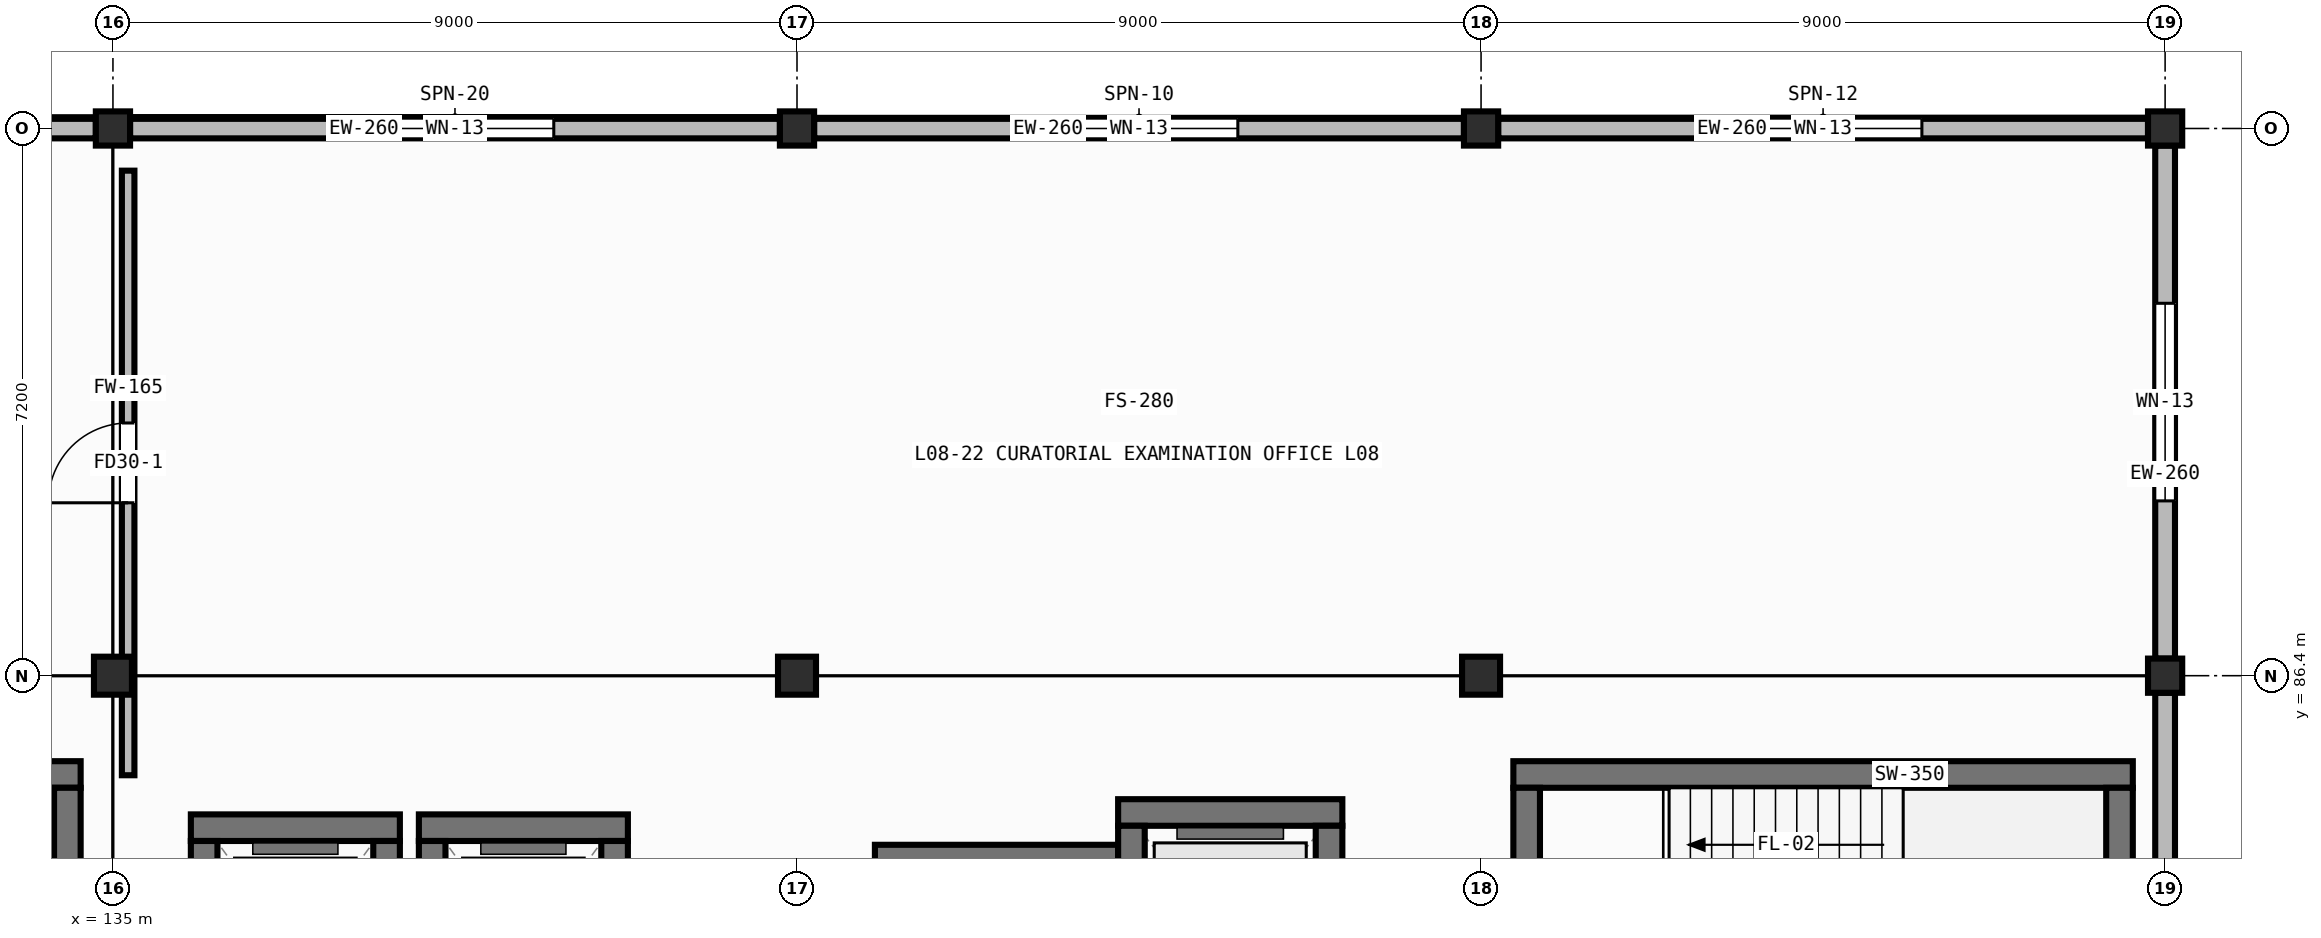
"""IFC4 building model, lengths in metres.
Left out: names, types, materials, properties, quantities, classifications, styles, units other than length and angle.
Written with IfcOpenShell. Run it as: python <this file> out.ifc"""

import sys

from ifc_helpers import new_model, si_unit, direction, frame, frame_2d, origin, origin_2d, place, context, subcontext, project, spatial, rectangle, hollow_rectangle, extrude, element, fill, save


model = new_model("IFC4")
c1 = context("Model", 3, precision=1e-05, world=origin(), true_north=direction((0.0, 1.0)))
c2 = subcontext(c1, "Body", "Model", "MODEL_VIEW")
j1 = project(units=[si_unit("LENGTHUNIT", "METRE"), si_unit("PLANEANGLEUNIT", "RADIAN")], contexts=[c1])
p1 = place(None, origin())
s1 = spatial("IfcSite", under=j1, at=p1, CompositionType="ELEMENT")
p2 = place(p1, origin())
s2 = spatial("IfcBuilding", under=s1, at=p2, CompositionType="ELEMENT")
p3 = place(p2, frame((0.0, 0.0, 27.8)))
s3 = spatial("IfcBuildingStorey", under=s2, at=p3, CompositionType="ELEMENT", Elevation=27.8)
p4 = place(p3, frame((135.0, 86.4, 0.0), z_axis=(0.0, 0.0, 1.0), x_axis=(1.0, 0.0, 0.0)))
e1 = element("IfcColumn", 1, at=p4, inside=s3, PredefinedType="COLUMN", context=c2, shape_type="SweptSolid", body=[
    extrude(hollow_rectangle(XDim=0.5, YDim=0.5, WallThickness=0.022, at=origin_2d()), origin(), (0.0, 0.0, 1.0), 3.6),
])
p5 = place(p3, frame((135.0, 93.6, 0.0), z_axis=(0.0, 0.0, 1.0), x_axis=(1.0, 0.0, 0.0)))
e2 = element("IfcColumn", 2, at=p5, inside=s3, PredefinedType="COLUMN", context=c2, shape_type="SweptSolid", body=[
    extrude(hollow_rectangle(XDim=0.45, YDim=0.45, WallThickness=0.019, at=origin_2d()), origin(), (0.0, 0.0, 1.0), 3.6),
])
p6 = place(p3, frame((144.0, 86.4, 0.0), z_axis=(0.0, 0.0, 1.0), x_axis=(1.0, 0.0, 0.0)))
e3 = element("IfcColumn", 3, at=p6, inside=s3, PredefinedType="COLUMN", context=c2, shape_type="SweptSolid", body=[
    extrude(hollow_rectangle(XDim=0.5, YDim=0.5, WallThickness=0.022, at=origin_2d()), origin(), (0.0, 0.0, 1.0), 3.6),
])
p7 = place(p3, frame((144.0, 93.6, 0.0), z_axis=(0.0, 0.0, 1.0), x_axis=(1.0, 0.0, 0.0)))
e4 = element("IfcColumn", 4, at=p7, inside=s3, PredefinedType="COLUMN", context=c2, shape_type="SweptSolid", body=[
    extrude(hollow_rectangle(XDim=0.45, YDim=0.45, WallThickness=0.019, at=origin_2d()), origin(), (0.0, 0.0, 1.0), 3.6),
])
p8 = place(p3, frame((153.0, 86.4, 0.0), z_axis=(0.0, 0.0, 1.0), x_axis=(1.0, 0.0, 0.0)))
e5 = element("IfcColumn", 5, at=p8, inside=s3, PredefinedType="COLUMN", context=c2, shape_type="SweptSolid", body=[
    extrude(hollow_rectangle(XDim=0.5, YDim=0.5, WallThickness=0.022, at=origin_2d()), origin(), (0.0, 0.0, 1.0), 3.6),
])
for number, where, z_axis, x_axis in (
    (6, (153.0, 93.6, 0.0), (0.0, 0.0, 1.0), (1.0, 0.0, 0.0)),
    (7, (162.0, 86.4, 0.0), (0.0, 0.0, 1.0), (1.0, 0.0, 0.0)),
    (8, (162.0, 93.6, 0.0), (0.0, 0.0, 1.0), (1.0, 0.0, 0.0)),
):
    element("IfcColumn", number, at=place(p3, frame(where, z_axis=z_axis, x_axis=x_axis)), inside=s3, PredefinedType="COLUMN", context=c2, shape_type="SweptSolid", body=[
        extrude(hollow_rectangle(XDim=0.45, YDim=0.45, WallThickness=0.019, at=origin_2d()), origin(), (0.0, 0.0, 1.0), 3.6),
    ])
p9 = place(p3, frame((134.775, 93.6, 0.0), z_axis=(0.0, 0.0, 1.0), x_axis=(-1.0, 0.0, 0.0)))
e9 = element("IfcWall", 9, at=p9, inside=s3, PredefinedType="STANDARD", context=c2, shape_type="SweptSolid", body=[
    extrude(rectangle(XDim=8.55, YDim=0.26, at=frame_2d((4.275, 0.0))), origin(), (0.0, 0.0, 1.0), 2.915),
])
p10 = place(p3, frame((143.775, 93.6, 0.0), z_axis=(0.0, 0.0, 1.0), x_axis=(-1.0, 0.0, 0.0)))
e10 = element("IfcWall", 10, at=p10, inside=s3, PredefinedType="STANDARD", context=c2, shape_type="SweptSolid", body=[
    extrude(rectangle(XDim=8.55, YDim=0.26, at=frame_2d((4.275, 0.0))), origin(), (0.0, 0.0, 1.0), 2.915),
])
p11 = place(p10, frame((2.975, 0.0, 0.85)))
e11 = element("IfcOpeningElement", 11, at=p11, cuts=e10, PredefinedType="OPENING", context=c2, shape_type="SweptSolid", body=[
    extrude(rectangle(XDim=2.6, YDim=1.6, at=frame_2d((1.3, 0.8))), frame((0.0, 0.142, 0.0), z_axis=(0.0, -1.0, 0.0), x_axis=(1.0, 0.0, 0.0)), (0.0, 0.0, 1.0), 0.284),
])
p12 = place(p3, frame((152.775, 93.6, 0.0), z_axis=(0.0, 0.0, 1.0), x_axis=(-1.0, 0.0, 0.0)))
e12 = element("IfcWall", 12, at=p12, inside=s3, PredefinedType="STANDARD", context=c2, shape_type="SweptSolid", body=[
    extrude(rectangle(XDim=8.55, YDim=0.26, at=frame_2d((4.275, 0.0))), origin(), (0.0, 0.0, 1.0), 2.915),
])
p13 = place(p12, frame((2.975, 0.0, 0.85)))
e13 = element("IfcOpeningElement", 13, at=p13, cuts=e12, PredefinedType="OPENING", context=c2, shape_type="SweptSolid", body=[
    extrude(rectangle(XDim=2.6, YDim=1.6, at=frame_2d((1.3, 0.8))), frame((0.0, 0.142, 0.0), z_axis=(0.0, -1.0, 0.0), x_axis=(1.0, 0.0, 0.0)), (0.0, 0.0, 1.0), 0.284),
])
p14 = place(p3, frame((161.775, 93.6, 0.0), z_axis=(0.0, 0.0, 1.0), x_axis=(-1.0, 0.0, 0.0)))
e14 = element("IfcWall", 14, at=p14, inside=s3, PredefinedType="STANDARD", context=c2, shape_type="SweptSolid", body=[
    extrude(rectangle(XDim=8.55, YDim=0.26, at=frame_2d((4.275, 0.0))), origin(), (0.0, 0.0, 1.0), 2.915),
])
p15 = place(p14, frame((2.975, 0.0, 0.85)))
e15 = element("IfcOpeningElement", 15, at=p15, cuts=e14, PredefinedType="OPENING", context=c2, shape_type="SweptSolid", body=[
    extrude(rectangle(XDim=2.6, YDim=1.6, at=frame_2d((1.3, 0.8))), frame((0.0, 0.142, 0.0), z_axis=(0.0, -1.0, 0.0), x_axis=(1.0, 0.0, 0.0)), (0.0, 0.0, 1.0), 0.284),
])
p16 = place(p3, frame((162.0, 86.175, 0.0), z_axis=(0.0, 0.0, 1.0), x_axis=(0.0, -1.0, 0.0)))
e16 = element("IfcWall", 16, at=p16, inside=s3, PredefinedType="STANDARD", context=c2, shape_type="SweptSolid", body=[
    extrude(rectangle(XDim=6.75, YDim=0.26, at=frame_2d((3.375, 0.0))), origin(), (0.0, 0.0, 1.0), 2.915),
])
p17 = place(p3, frame((162.0, 93.375, 0.0), z_axis=(0.0, 0.0, 1.0), x_axis=(0.0, -1.0, 0.0)))
e17 = element("IfcWall", 17, at=p17, inside=s3, PredefinedType="STANDARD", context=c2, shape_type="SweptSolid", body=[
    extrude(rectangle(XDim=6.75, YDim=0.26, at=frame_2d((3.375, 0.0))), origin(), (0.0, 0.0, 1.0), 2.915),
])
p18 = place(p17, frame((2.075, 0.0, 0.85)))
e18 = element("IfcOpeningElement", 18, at=p18, cuts=e17, PredefinedType="OPENING", context=c2, shape_type="SweptSolid", body=[
    extrude(rectangle(XDim=2.6, YDim=1.6, at=frame_2d((1.3, 0.8))), frame((0.0, 0.142, 0.0), z_axis=(0.0, -1.0, 0.0), x_axis=(1.0, 0.0, 0.0)), (0.0, 0.0, 1.0), 0.284),
])
p19 = place(p3, frame((126.425, 85.1, 0.0), z_axis=(0.0, 0.0, 1.0), x_axis=(1.0, 0.0, 0.0)))
e19 = element("IfcWall", 19, at=p19, inside=s3, PredefinedType="SHEAR", context=c2, shape_type="SweptSolid", body=[
    extrude(rectangle(XDim=8.15, YDim=0.35, at=frame_2d((4.075, 0.0))), origin(), (0.0, 0.0, 1.0), 3.315),
])
p20 = place(p3, frame((134.4, 81.375, 0.0), z_axis=(0.0, 0.0, 1.0), x_axis=(0.0, 1.0, 0.0)))
e20 = element("IfcWall", 20, at=p20, inside=s3, PredefinedType="SHEAR", context=c2, shape_type="SweptSolid", body=[
    extrude(rectangle(XDim=3.55, YDim=0.35, at=frame_2d((1.775, 0.0))), origin(), (0.0, 0.0, 1.0), 3.315),
])
p21 = place(p3, frame((153.425, 85.1, 0.0), z_axis=(0.0, 0.0, 1.0), x_axis=(1.0, 0.0, 0.0)))
e21 = element("IfcWall", 21, at=p21, inside=s3, PredefinedType="SHEAR", context=c2, shape_type="SweptSolid", body=[
    extrude(rectangle(XDim=8.15, YDim=0.35, at=frame_2d((4.075, 0.0))), origin(), (0.0, 0.0, 1.0), 3.315),
])
for number, where, z_axis, x_axis in (
    (22, (153.6, 81.375, 0.0), (0.0, 0.0, 1.0), (0.0, 1.0, 0.0)),
    (23, (161.4, 81.375, 0.0), (0.0, 0.0, 1.0), (0.0, 1.0, 0.0)),
):
    element("IfcWall", number, at=place(p3, frame(where, z_axis=z_axis, x_axis=x_axis)), inside=s3, PredefinedType="SHEAR", context=c2, shape_type="SweptSolid", body=[
        extrude(rectangle(XDim=3.55, YDim=0.35, at=frame_2d((1.775, 0.0))), origin(), (0.0, 0.0, 1.0), 3.315),
    ])
p22 = place(p3, frame((136.025, 84.4, 0.0), z_axis=(0.0, 0.0, 1.0), x_axis=(1.0, 0.0, 0.0)))
e24 = element("IfcWall", 24, at=p22, inside=s3, PredefinedType="SHEAR", context=c2, shape_type="SweptSolid", body=[
    extrude(rectangle(XDim=2.75, YDim=0.35, at=frame_2d((1.375, 0.0))), origin(), (0.0, 0.0, 1.0), 3.315),
])
for number, where, z_axis, x_axis in (
    (25, (136.2, 81.375, 0.0), (0.0, 0.0, 1.0), (0.0, 1.0, 0.0)),
    (26, (138.6, 81.375, 0.0), (0.0, 0.0, 1.0), (0.0, 1.0, 0.0)),
):
    element("IfcWall", number, at=place(p3, frame(where, z_axis=z_axis, x_axis=x_axis)), inside=s3, PredefinedType="SHEAR", context=c2, shape_type="SweptSolid", body=[
        extrude(rectangle(XDim=2.85, YDim=0.35, at=frame_2d((1.425, 0.0))), origin(), (0.0, 0.0, 1.0), 3.315),
    ])
p23 = place(p3, frame((139.025, 84.4, 0.0), z_axis=(0.0, 0.0, 1.0), x_axis=(1.0, 0.0, 0.0)))
e27 = element("IfcWall", 27, at=p23, inside=s3, PredefinedType="SHEAR", context=c2, shape_type="SweptSolid", body=[
    extrude(rectangle(XDim=2.75, YDim=0.35, at=frame_2d((1.375, 0.0))), origin(), (0.0, 0.0, 1.0), 3.315),
])
for number, where, z_axis, x_axis in (
    (28, (139.2, 81.375, 0.0), (0.0, 0.0, 1.0), (0.0, 1.0, 0.0)),
    (29, (141.6, 81.375, 0.0), (0.0, 0.0, 1.0), (0.0, 1.0, 0.0)),
):
    element("IfcWall", number, at=place(p3, frame(where, z_axis=z_axis, x_axis=x_axis)), inside=s3, PredefinedType="SHEAR", context=c2, shape_type="SweptSolid", body=[
        extrude(rectangle(XDim=2.85, YDim=0.35, at=frame_2d((1.425, 0.0))), origin(), (0.0, 0.0, 1.0), 3.315),
    ])
p24 = place(p3, frame((145.025, 84.0, 0.0), z_axis=(0.0, 0.0, 1.0), x_axis=(1.0, 0.0, 0.0)))
e30 = element("IfcWall", 30, at=p24, inside=s3, PredefinedType="SHEAR", context=c2, shape_type="SweptSolid", body=[
    extrude(rectangle(XDim=3.2, YDim=0.35, at=frame_2d((1.6, 0.0))), origin(), (0.0, 0.0, 1.0), 3.315),
])
p25 = place(p3, frame((148.225, 84.6, 0.0), z_axis=(0.0, 0.0, 1.0), x_axis=(1.0, 0.0, 0.0)))
e31 = element("IfcWall", 31, at=p25, inside=s3, PredefinedType="SHEAR", context=c2, shape_type="SweptSolid", body=[
    extrude(rectangle(XDim=2.95, YDim=0.35, at=frame_2d((1.475, 0.0))), origin(), (0.0, 0.0, 1.0), 3.315),
])
for number, where, z_axis, x_axis in (
    (32, (148.4, 81.375, 0.0), (0.0, 0.0, 1.0), (0.0, 1.0, 0.0)),
    (33, (151.0, 81.375, 0.0), (0.0, 0.0, 1.0), (0.0, 1.0, 0.0)),
):
    element("IfcWall", number, at=place(p3, frame(where, z_axis=z_axis, x_axis=x_axis)), inside=s3, PredefinedType="SHEAR", context=c2, shape_type="SweptSolid", body=[
        extrude(rectangle(XDim=3.05, YDim=0.35, at=frame_2d((1.525, 0.0))), origin(), (0.0, 0.0, 1.0), 3.315),
    ])
p26 = place(p3, frame((135.2, 85.09, 0.0), z_axis=(0.0, 0.0, 1.0), x_axis=(0.0, 1.0, 0.0)))
e34 = element("IfcWall", 34, at=p26, inside=s3, PredefinedType="PARTITIONING", context=c2, shape_type="SweptSolid", body=[
    extrude(rectangle(XDim=7.955, YDim=0.165, at=frame_2d((3.978, 0.0))), origin(), (0.0, 0.0, 1.0), 2.595),
])
p27 = place(p26, frame((3.585, 0.0, 0.0)))
e35 = element("IfcOpeningElement", 35, at=p27, cuts=e34, PredefinedType="OPENING", context=c2, shape_type="SweptSolid", body=[
    extrude(rectangle(XDim=1.05, YDim=2.1, at=frame_2d((0.525, 1.05))), frame((0.0, 0.094, 0.0), z_axis=(0.0, -1.0, 0.0), x_axis=(1.0, 0.0, 0.0)), (0.0, 0.0, 1.0), 0.189),
])
p28 = place(p11, origin())
e36 = element("IfcWindow", 36, at=p28, inside=s3, PartitioningType="DOUBLE_PANEL_VERTICAL", PredefinedType="WINDOW", context=c2, shape_type="SweptSolid", body=[
    extrude(rectangle(XDim=2.6, YDim=1.6, at=frame_2d((1.3, 0.8))), frame((0.0, 0.03, 0.0), z_axis=(0.0, -1.0, 0.0), x_axis=(1.0, 0.0, 0.0)), (0.0, 0.0, 1.0), 0.06),
])
fill(e11, e36)
p29 = place(p13, origin())
e37 = element("IfcWindow", 37, at=p29, inside=s3, PartitioningType="DOUBLE_PANEL_VERTICAL", PredefinedType="WINDOW", context=c2, shape_type="SweptSolid", body=[
    extrude(rectangle(XDim=2.6, YDim=1.6, at=frame_2d((1.3, 0.8))), frame((0.0, 0.03, 0.0), z_axis=(0.0, -1.0, 0.0), x_axis=(1.0, 0.0, 0.0)), (0.0, 0.0, 1.0), 0.06),
])
fill(e13, e37)
p30 = place(p15, origin())
e38 = element("IfcWindow", 38, at=p30, inside=s3, PartitioningType="DOUBLE_PANEL_VERTICAL", PredefinedType="WINDOW", context=c2, shape_type="SweptSolid", body=[
    extrude(rectangle(XDim=2.6, YDim=1.6, at=frame_2d((1.3, 0.8))), frame((0.0, 0.03, 0.0), z_axis=(0.0, -1.0, 0.0), x_axis=(1.0, 0.0, 0.0)), (0.0, 0.0, 1.0), 0.06),
])
fill(e15, e38)
p31 = place(p18, origin())
e39 = element("IfcWindow", 39, at=p31, inside=s3, PartitioningType="DOUBLE_PANEL_VERTICAL", PredefinedType="WINDOW", context=c2, shape_type="SweptSolid", body=[
    extrude(rectangle(XDim=2.6, YDim=1.6, at=frame_2d((1.3, 0.8))), frame((0.0, 0.03, 0.0), z_axis=(0.0, -1.0, 0.0), x_axis=(1.0, 0.0, 0.0)), (0.0, 0.0, 1.0), 0.06),
])
fill(e18, e39)
p32 = place(p27, origin())
e40 = element("IfcDoor", 40, at=p32, inside=s3, OperationType="SINGLE_SWING_LEFT", PredefinedType="DOOR", context=c2, shape_type="SweptSolid", body=[
    extrude(rectangle(XDim=1.05, YDim=2.1, at=frame_2d((0.525, 1.05))), frame((0.0, 0.025, 0.0), z_axis=(0.0, -1.0, 0.0), x_axis=(1.0, 0.0, 0.0)), (0.0, 0.0, 1.0), 0.05),
])
fill(e35, e40)
save(model, sys.argv[1])
